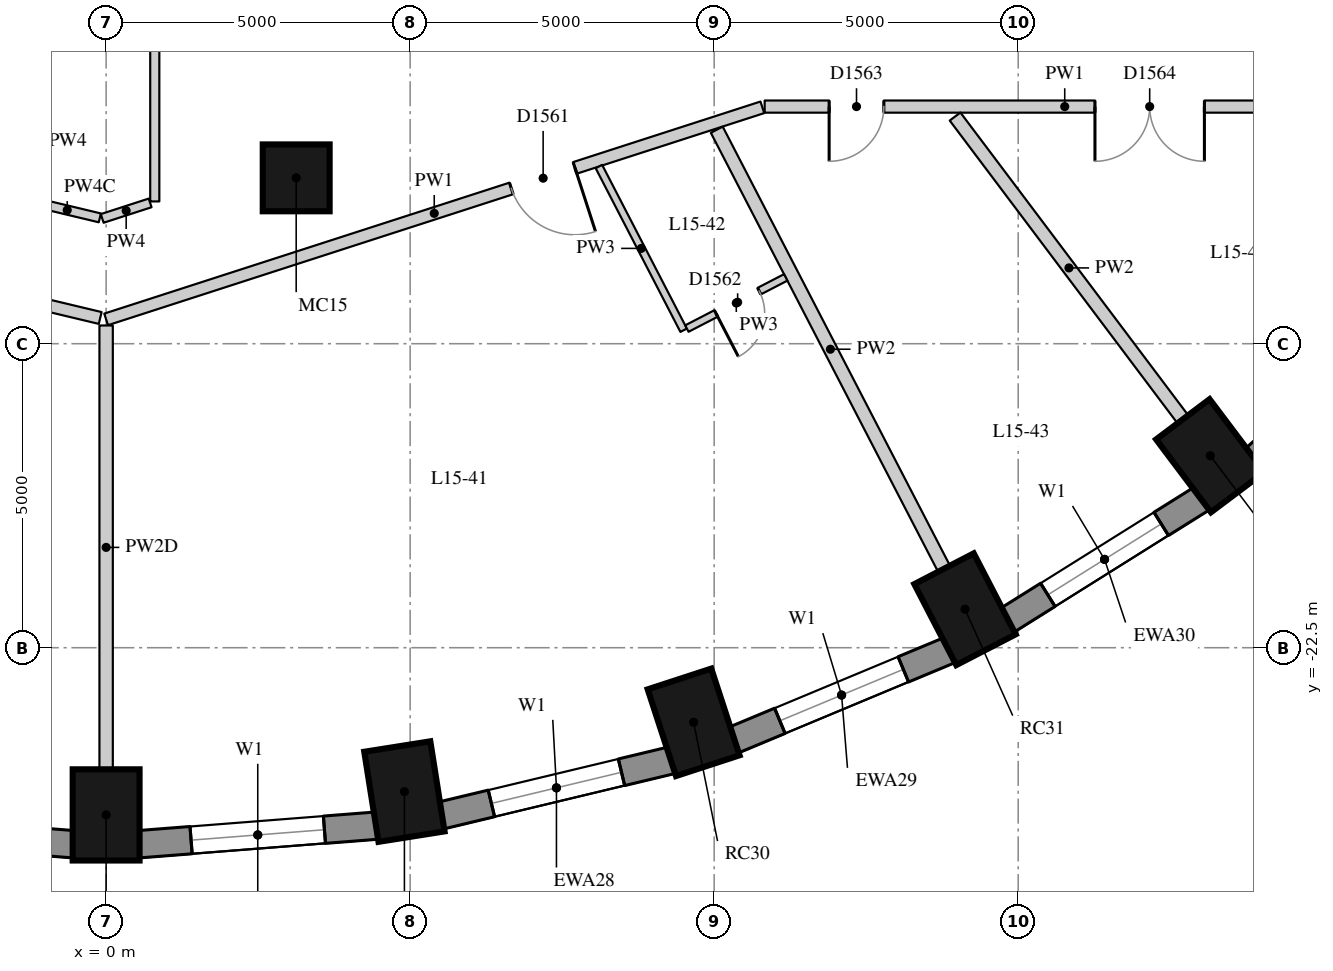
"""IFC4 building model, lengths in metres.
Left out: names, types, materials, properties, quantities, classifications, styles, units other than length and angle.
Written with IfcOpenShell. Run it as: python <this file> out.ifc"""

import sys

from ifc_helpers import new_model, si_unit, direction, frame, frame_2d, origin, origin_2d, place, context, subcontext, project, spatial, rectangle, extrude, element, fill, save


model = new_model("IFC4")
c1 = context("Model", 3, precision=1e-05, world=origin(), true_north=direction((0.0, 1.0)))
c2 = subcontext(c1, "Body", "Model", "MODEL_VIEW")
j1 = project(units=[si_unit("LENGTHUNIT", "METRE"), si_unit("PLANEANGLEUNIT", "RADIAN")], contexts=[c1])
p1 = place(None, origin())
s1 = spatial("IfcSite", under=j1, at=p1, CompositionType="ELEMENT")
p2 = place(p1, origin())
s2 = spatial("IfcBuilding", under=s1, at=p2, CompositionType="ELEMENT")
p3 = place(p2, frame((0.0, 0.0, 58.0)))
s3 = spatial("IfcBuildingStorey", under=s2, at=p3, CompositionType="ELEMENT", Elevation=58.0)
for number, where, z_axis, x_axis in (
    (1, (0.0, -25.25, 0.0), (0.0, 0.0, 1.0), (0.0, -1.0, 0.0)),
    (2, (4.906, -24.866, 0.0), (0.0, 0.0, 1.0), (0.156, -0.988, 0.0)),
    (3, (9.662, -23.727, 0.0), (0.0, 0.0, 1.0), (0.31, -0.951, 0.0)),
    (4, (14.125, -21.867, 0.0), (0.0, 0.0, 1.0), (0.46, -0.888, 0.0)),
    (5, (18.159, -19.343, 0.0), (0.0, 0.0, 1.0), (0.601, -0.799, 0.0)),
):
    element("IfcColumn", number, at=place(p3, frame(where, z_axis=z_axis, x_axis=x_axis)), inside=s3, PredefinedType="COLUMN", context=c2, shape_type="SweptSolid", body=[
        extrude(rectangle(XDim=1.5, YDim=1.1, at=origin_2d()), origin(), (0.0, 0.0, 1.0), 3.3),
    ])
p4 = place(p3, frame((3.126, -14.772, 0.0), z_axis=(0.0, 0.0, 1.0), x_axis=(1.0, 0.0, 0.0)))
e6 = element("IfcColumn", 6, at=p4, inside=s3, PredefinedType="COLUMN", context=c2, shape_type="SweptSolid", body=[
    extrude(rectangle(XDim=1.1, YDim=1.1, at=origin_2d()), origin(), (0.0, 0.0, 1.0), 3.3),
])
p5 = place(p3, frame((-4.457, -25.426, 0.0), z_axis=(0.0, 0.0, 1.0), x_axis=(0.996955972145, -0.077966592873, 0.0)))
e7 = element("IfcWall", 7, at=p5, inside=s3, PredefinedType="SOLIDWALL", context=c2, shape_type="SweptSolid", body=[
    extrude(rectangle(XDim=3.939, YDim=0.45, at=frame_2d((1.97, 0.0))), origin(), (0.0, 0.0, 1.0), 3.02),
])
p6 = place(p5, frame((0.87, 0.0, 0.4)))
e8 = element("IfcOpeningElement", 8, at=p6, cuts=e7, PredefinedType="OPENING", context=c2, shape_type="SweptSolid", body=[
    extrude(rectangle(XDim=2.2, YDim=1.75, at=frame_2d((1.1, 0.875))), frame((0.0, 0.235, 0.0), z_axis=(0.0, -1.0, 0.0), x_axis=(1.0, 0.0, 0.0)), (0.0, 0.0, 1.0), 0.47),
])
p7 = place(p3, frame((0.53, -25.733, 0.0), z_axis=(0.0, 0.0, 1.0), x_axis=(0.996955972145, 0.077966592873, 0.0)))
e9 = element("IfcWall", 9, at=p7, inside=s3, PredefinedType="SOLIDWALL", context=c2, shape_type="SweptSolid", body=[
    extrude(rectangle(XDim=3.939, YDim=0.45, at=frame_2d((1.97, 0.0))), origin(), (0.0, 0.0, 1.0), 3.02),
])
p8 = place(p7, frame((0.87, 0.0, 0.4)))
e10 = element("IfcOpeningElement", 10, at=p8, cuts=e9, PredefinedType="OPENING", context=c2, shape_type="SweptSolid", body=[
    extrude(rectangle(XDim=2.2, YDim=1.75, at=frame_2d((1.1, 0.875))), frame((0.0, 0.235, 0.0), z_axis=(0.0, -1.0, 0.0), x_axis=(1.0, 0.0, 0.0)), (0.0, 0.0, 1.0), 0.47),
])
p9 = place(p3, frame((5.504, -25.26, 0.0), z_axis=(0.0, 0.0, 1.0), x_axis=(0.972496561493, 0.232917233979, 0.0)))
e11 = element("IfcWall", 11, at=p9, inside=s3, PredefinedType="SOLIDWALL", context=c2, shape_type="SweptSolid", body=[
    extrude(rectangle(XDim=3.911, YDim=0.45, at=frame_2d((1.956, 0.0))), origin(), (0.0, 0.0, 1.0), 3.02),
])
p10 = place(p9, frame((0.855, 0.0, 0.4)))
e12 = element("IfcOpeningElement", 12, at=p10, cuts=e11, PredefinedType="OPENING", context=c2, shape_type="SweptSolid", body=[
    extrude(rectangle(XDim=2.2, YDim=1.75, at=frame_2d((1.1, 0.875))), frame((0.0, 0.235, 0.0), z_axis=(0.0, -1.0, 0.0), x_axis=(1.0, 0.0, 0.0)), (0.0, 0.0, 1.0), 0.47),
])
p11 = place(p3, frame((10.315, -24.021, 0.0), z_axis=(0.0, 0.0, 1.0), x_axis=(0.923031964282, 0.384723267966, 0.0)))
e13 = element("IfcWall", 13, at=p11, inside=s3, PredefinedType="SOLIDWALL", context=c2, shape_type="SweptSolid", body=[
    extrude(rectangle(XDim=3.856, YDim=0.45, at=frame_2d((1.928, 0.0))), origin(), (0.0, 0.0, 1.0), 3.02),
])
p12 = place(p11, frame((0.828, 0.0, 0.4)))
e14 = element("IfcOpeningElement", 14, at=p12, cuts=e13, PredefinedType="OPENING", context=c2, shape_type="SweptSolid", body=[
    extrude(rectangle(XDim=2.2, YDim=1.75, at=frame_2d((1.1, 0.875))), frame((0.0, 0.235, 0.0), z_axis=(0.0, -1.0, 0.0), x_axis=(1.0, 0.0, 0.0)), (0.0, 0.0, 1.0), 0.47),
])
p13 = place(p3, frame((14.817, -22.051, 0.0), z_axis=(0.0, 0.0, 1.0), x_axis=(0.847635480093, 0.530579016629, 0.0)))
e15 = element("IfcWall", 15, at=p13, inside=s3, PredefinedType="SOLIDWALL", context=c2, shape_type="SweptSolid", body=[
    extrude(rectangle(XDim=3.782, YDim=0.45, at=frame_2d((1.891, 0.0))), origin(), (0.0, 0.0, 1.0), 3.02),
])
p14 = place(p13, frame((0.791, 0.0, 0.4)))
e16 = element("IfcOpeningElement", 16, at=p14, cuts=e15, PredefinedType="OPENING", context=c2, shape_type="SweptSolid", body=[
    extrude(rectangle(XDim=2.2, YDim=1.75, at=frame_2d((1.1, 0.875))), frame((0.0, 0.235, 0.0), z_axis=(0.0, -1.0, 0.0), x_axis=(1.0, 0.0, 0.0)), (0.0, 0.0, 1.0), 0.47),
])
p15 = place(p3, frame((18.871, -19.407, 0.0), z_axis=(0.0, 0.0, 1.0), x_axis=(0.745526233716, 0.66647628228, 0.0)))
e17 = element("IfcWall", 17, at=p15, inside=s3, PredefinedType="SOLIDWALL", context=c2, shape_type="SweptSolid", body=[
    extrude(rectangle(XDim=3.697, YDim=0.45, at=frame_2d((1.848, 0.0))), origin(), (0.0, 0.0, 1.0), 3.02),
])
p16 = place(p3, frame((20.7, -13.6, 0.0), z_axis=(0.0, 0.0, 1.0), x_axis=(-1.0, 0.0, 0.0)))
e18 = element("IfcWall", 18, at=p16, inside=s3, PredefinedType="PARTITIONING", context=c2, shape_type="SweptSolid", body=[
    extrude(rectangle(XDim=9.87, YDim=0.2, at=frame_2d((4.935, 0.0))), origin(), (0.0, 0.0, 1.0), 3.02),
])
p17 = place(p16, frame((7.909, 0.0, 0.0)))
e19 = element("IfcOpeningElement", 19, at=p17, cuts=e18, PredefinedType="OPENING", context=c2, shape_type="SweptSolid", body=[
    extrude(rectangle(XDim=0.9, YDim=2.1, at=frame_2d((0.45, 1.05))), frame((0.0, 0.11, 0.0), z_axis=(0.0, -1.0, 0.0), x_axis=(1.0, 0.0, 0.0)), (0.0, 0.0, 1.0), 0.22),
])
p18 = place(p16, frame((2.638, 0.0, 0.0)))
e20 = element("IfcOpeningElement", 20, at=p18, cuts=e18, PredefinedType="OPENING", context=c2, shape_type="SweptSolid", body=[
    extrude(rectangle(XDim=1.8, YDim=2.1, at=frame_2d((0.9, 1.05))), frame((0.0, 0.11, 0.0), z_axis=(0.0, -1.0, 0.0), x_axis=(1.0, 0.0, 0.0)), (0.0, 0.0, 1.0), 0.22),
])
p19 = place(p3, frame((10.792, -13.612, 0.0), z_axis=(0.0, 0.0, 1.0), x_axis=(-0.951542928403, -0.307515943336, 0.0)))
e21 = element("IfcWall", 21, at=p19, inside=s3, PredefinedType="PARTITIONING", context=c2, shape_type="SweptSolid", body=[
    extrude(rectangle(XDim=11.342, YDim=0.2, at=frame_2d((5.671, 0.0))), origin(), (0.0, 0.0, 1.0), 3.02),
])
p20 = place(p19, frame((3.239, 0.0, 0.0)))
e22 = element("IfcOpeningElement", 22, at=p20, cuts=e21, PredefinedType="OPENING", context=c2, shape_type="SweptSolid", body=[
    extrude(rectangle(XDim=1.1, YDim=2.1, at=frame_2d((0.55, 1.05))), frame((0.0, 0.11, 0.0), z_axis=(0.0, -1.0, 0.0), x_axis=(1.0, 0.0, 0.0)), (0.0, 0.0, 1.0), 0.22),
])
p21 = place(p3, frame((-0.098, -17.077, 0.0), z_axis=(0.0, 0.0, 1.0), x_axis=(-0.972607318404, 0.232454305588, 0.0)))
e23 = element("IfcWall", 23, at=p21, inside=s3, PredefinedType="PARTITIONING", context=c2, shape_type="SweptSolid", body=[
    extrude(rectangle(XDim=8.022, YDim=0.2, at=frame_2d((4.011, 0.0))), origin(), (0.0, 0.0, 1.0), 3.02),
])
p22 = place(p21, frame((1.479, 0.0, 0.0)))
e24 = element("IfcOpeningElement", 24, at=p22, cuts=e23, PredefinedType="OPENING", context=c2, shape_type="SweptSolid", body=[
    extrude(rectangle(XDim=1.1, YDim=2.1, at=frame_2d((0.55, 1.05))), frame((0.0, 0.11, 0.0), z_axis=(0.0, -1.0, 0.0), x_axis=(1.0, 0.0, 0.0)), (0.0, 0.0, 1.0), 0.22),
])
p23 = place(p3, frame((0.8, -9.23, 0.0), z_axis=(0.0, 0.0, 1.0), x_axis=(0.0, -1.0, 0.0)))
e25 = element("IfcWall", 25, at=p23, inside=s3, PredefinedType="PARTITIONING", context=c2, shape_type="SweptSolid", body=[
    extrude(rectangle(XDim=5.93, YDim=0.15, at=frame_2d((2.965, 0.0))), origin(), (0.0, 0.0, 1.0), 3.02),
])
p24 = place(p23, frame((2.515, 0.0, 0.0)))
e26 = element("IfcOpeningElement", 26, at=p24, cuts=e25, PredefinedType="OPENING", context=c2, shape_type="SweptSolid", body=[
    extrude(rectangle(XDim=0.9, YDim=2.1, at=frame_2d((0.45, 1.05))), frame((0.0, 0.085, 0.0), z_axis=(0.0, -1.0, 0.0), x_axis=(1.0, 0.0, 0.0)), (0.0, 0.0, 1.0), 0.17),
])
p25 = place(p3, frame((0.724, -15.184, 0.0), z_axis=(0.0, 0.0, 1.0), x_axis=(-0.951444518554, -0.307820285415, 0.0)))
e27 = element("IfcWall", 27, at=p25, inside=s3, PredefinedType="PARTITIONING", context=c2, shape_type="SweptSolid", body=[
    extrude(rectangle(XDim=0.829, YDim=0.15, at=frame_2d((0.415, 0.0))), origin(), (0.0, 0.0, 1.0), 3.02),
])
p26 = place(p3, frame((-0.104, -15.43, 0.0), z_axis=(0.0, 0.0, 1.0), x_axis=(-0.972630060885, 0.232359128642, 0.0)))
e28 = element("IfcWall", 28, at=p26, inside=s3, PredefinedType="PARTITIONING", context=c2, shape_type="SweptSolid", body=[
    extrude(rectangle(XDim=1.102, YDim=0.15, at=frame_2d((0.551, 0.0))), origin(), (0.0, 0.0, 1.0), 2.42),
])
p27 = place(p3, frame((0.0, -24.5, 0.0), z_axis=(0.0, 0.0, 1.0), x_axis=(0.0, 1.0, 0.0)))
e29 = element("IfcWall", 29, at=p27, inside=s3, PredefinedType="PARTITIONING", context=c2, shape_type="SweptSolid", body=[
    extrude(rectangle(XDim=7.3, YDim=0.22, at=frame_2d((3.65, 0.0))), origin(), (0.0, 0.0, 1.0), 2.47),
])
p28 = place(p3, frame((13.78, -21.201, 0.0), z_axis=(0.0, 0.0, 1.0), x_axis=(-0.459685115008, 0.888081975405, 0.0)))
e30 = element("IfcWall", 30, at=p28, inside=s3, PredefinedType="PARTITIONING", context=c2, shape_type="SweptSolid", body=[
    extrude(rectangle(XDim=8.131, YDim=0.22, at=frame_2d((4.065, 0.0))), origin(), (0.0, 0.0, 1.0), 3.02),
])
p29 = place(p3, frame((17.708, -18.743, 0.0), z_axis=(0.0, 0.0, 1.0), x_axis=(-0.601177883261, 0.799115231164, 0.0)))
e31 = element("IfcWall", 31, at=p29, inside=s3, PredefinedType="PARTITIONING", context=c2, shape_type="SweptSolid", body=[
    extrude(rectangle(XDim=6.231, YDim=0.22, at=frame_2d((3.116, 0.0))), origin(), (0.0, 0.0, 1.0), 3.02),
])
p30 = place(p3, frame((8.104, -14.586, 0.0), z_axis=(0.0, 0.0, 1.0), x_axis=(0.459668270166, -0.888090694357, 0.0)))
e32 = element("IfcWall", 32, at=p30, inside=s3, PredefinedType="PARTITIONING", context=c2, shape_type="SweptSolid", body=[
    extrude(rectangle(XDim=3.032, YDim=0.12, at=frame_2d((1.516, 0.0))), origin(), (0.0, 0.0, 1.0), 3.02),
])
p31 = place(p3, frame((9.551, -17.251, 0.0), z_axis=(0.0, 0.0, 1.0), x_axis=(0.88806930088, 0.459709600546, 0.0)))
e33 = element("IfcWall", 33, at=p31, inside=s3, PredefinedType="PARTITIONING", context=c2, shape_type="SweptSolid", body=[
    extrude(rectangle(XDim=1.83, YDim=0.12, at=frame_2d((0.915, 0.0))), origin(), (0.0, 0.0, 1.0), 3.02),
])
p32 = place(p31, frame((0.54, 0.0, 0.0)))
e34 = element("IfcOpeningElement", 34, at=p32, cuts=e33, PredefinedType="OPENING", context=c2, shape_type="SweptSolid", body=[
    extrude(rectangle(XDim=0.8, YDim=2.1, at=frame_2d((0.4, 1.05))), frame((0.0, 0.07, 0.0), z_axis=(0.0, -1.0, 0.0), x_axis=(1.0, 0.0, 0.0)), (0.0, 0.0, 1.0), 0.14),
])
p33 = place(p8, origin())
e35 = element("IfcWindow", 35, at=p33, inside=s3, PartitioningType="SINGLE_PANEL", PredefinedType="WINDOW", context=c2, shape_type="SweptSolid", body=[
    extrude(rectangle(XDim=2.2, YDim=1.75, at=frame_2d((1.1, 0.875))), frame((0.0, 0.035, 0.0), z_axis=(0.0, -1.0, 0.0), x_axis=(1.0, 0.0, 0.0)), (0.0, 0.0, 1.0), 0.06),
])
fill(e10, e35)
p34 = place(p10, origin())
e36 = element("IfcWindow", 36, at=p34, inside=s3, PartitioningType="SINGLE_PANEL", PredefinedType="WINDOW", context=c2, shape_type="SweptSolid", body=[
    extrude(rectangle(XDim=2.2, YDim=1.75, at=frame_2d((1.1, 0.875))), frame((0.0, 0.035, 0.0), z_axis=(0.0, -1.0, 0.0), x_axis=(1.0, 0.0, 0.0)), (0.0, 0.0, 1.0), 0.06),
])
fill(e12, e36)
p35 = place(p12, origin())
e37 = element("IfcWindow", 37, at=p35, inside=s3, PartitioningType="SINGLE_PANEL", PredefinedType="WINDOW", context=c2, shape_type="SweptSolid", body=[
    extrude(rectangle(XDim=2.2, YDim=1.75, at=frame_2d((1.1, 0.875))), frame((0.0, 0.035, 0.0), z_axis=(0.0, -1.0, 0.0), x_axis=(1.0, 0.0, 0.0)), (0.0, 0.0, 1.0), 0.06),
])
fill(e14, e37)
p36 = place(p14, origin())
e38 = element("IfcWindow", 38, at=p36, inside=s3, PartitioningType="SINGLE_PANEL", PredefinedType="WINDOW", context=c2, shape_type="SweptSolid", body=[
    extrude(rectangle(XDim=2.2, YDim=1.75, at=frame_2d((1.1, 0.875))), frame((0.0, 0.035, 0.0), z_axis=(0.0, -1.0, 0.0), x_axis=(1.0, 0.0, 0.0)), (0.0, 0.0, 1.0), 0.06),
])
fill(e16, e38)
p37 = place(p20, origin())
e39 = element("IfcDoor", 39, at=p37, inside=s3, OperationType="SINGLE_SWING_LEFT", PredefinedType="DOOR", context=c2, shape_type="SweptSolid", body=[
    extrude(rectangle(XDim=1.1, YDim=2.1, at=frame_2d((0.55, 1.05))), frame((0.0, 0.025, 0.0), z_axis=(0.0, -1.0, 0.0), x_axis=(1.0, 0.0, 0.0)), (0.0, 0.0, 1.0), 0.05),
])
fill(e22, e39)
p38 = place(p32, origin())
e40 = element("IfcDoor", 40, at=p38, inside=s3, OperationType="SINGLE_SWING_RIGHT", PredefinedType="DOOR", context=c2, shape_type="SweptSolid", body=[
    extrude(rectangle(XDim=0.8, YDim=2.1, at=frame_2d((0.4, 1.05))), frame((0.0, 0.025, 0.0), z_axis=(0.0, -1.0, 0.0), x_axis=(1.0, 0.0, 0.0)), (0.0, 0.0, 1.0), 0.05),
])
fill(e34, e40)
p39 = place(p17, origin())
e41 = element("IfcDoor", 41, at=p39, inside=s3, OperationType="SINGLE_SWING_RIGHT", PredefinedType="DOOR", context=c2, shape_type="SweptSolid", body=[
    extrude(rectangle(XDim=0.9, YDim=2.1, at=frame_2d((0.45, 1.05))), frame((0.0, 0.025, 0.0), z_axis=(0.0, -1.0, 0.0), x_axis=(1.0, 0.0, 0.0)), (0.0, 0.0, 1.0), 0.05),
])
fill(e19, e41)
p40 = place(p18, origin())
e42 = element("IfcDoor", 42, at=p40, inside=s3, OperationType="DOUBLE_DOOR_SINGLE_SWING", PredefinedType="DOOR", context=c2, shape_type="SweptSolid", body=[
    extrude(rectangle(XDim=1.8, YDim=2.1, at=frame_2d((0.9, 1.05))), frame((0.0, 0.025, 0.0), z_axis=(0.0, -1.0, 0.0), x_axis=(1.0, 0.0, 0.0)), (0.0, 0.0, 1.0), 0.05),
])
fill(e20, e42)
save(model, sys.argv[1])
